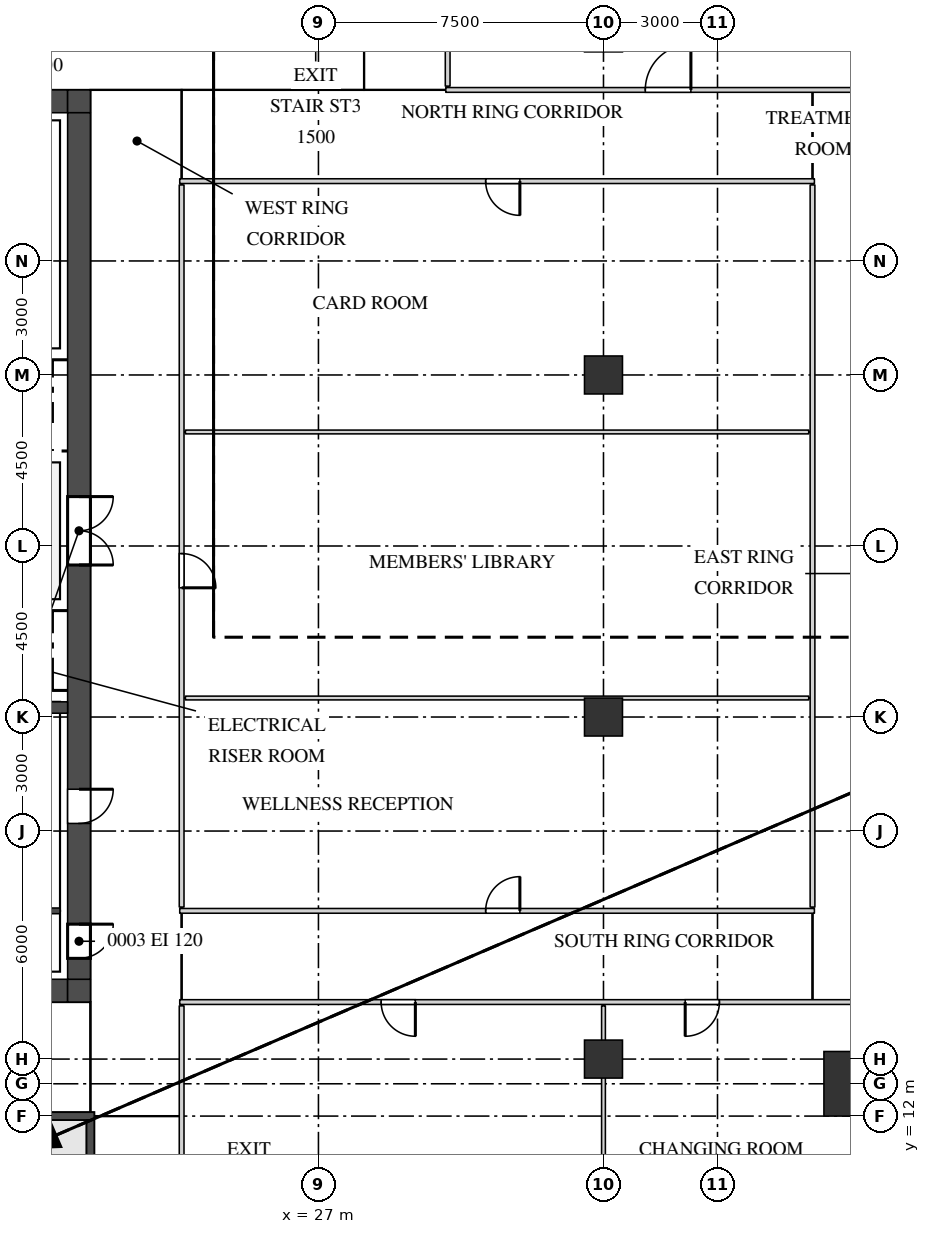
"""IFC4 building model, lengths in metres.
Left out: names, types, materials, properties, quantities, classifications, styles, units other than length and angle.
Written with IfcOpenShell. Run it as: python <this file> out.ifc"""

import sys

from ifc_helpers import new_model, si_unit, direction, frame, frame_2d, origin, origin_2d, place, context, subcontext, project, spatial, rectangle, extrude, source, transform, mapped, element, fill, save


model = new_model("IFC4")
c1 = context("Model", 3, precision=1e-05, world=origin(), true_north=direction((0.0, 1.0)))
c2 = subcontext(c1, "Body", "Model", "MODEL_VIEW")
j1 = project(units=[si_unit("LENGTHUNIT", "METRE"), si_unit("PLANEANGLEUNIT", "RADIAN")], contexts=[c1])
p1 = place(None, origin())
s1 = spatial("IfcSite", under=j1, at=p1, CompositionType="ELEMENT")
p2 = place(p1, origin())
s2 = spatial("IfcBuilding", under=s1, at=p2, CompositionType="ELEMENT")
p3 = place(p2, frame((0.0, 0.0, 298.2)))
s3 = spatial("IfcBuildingStorey", under=s2, at=p3, CompositionType="ELEMENT", Elevation=298.2)
m1 = source(origin(), c2, "Body", "SweptSolid", [
    extrude(rectangle(XDim=14.4, YDim=0.6, at=frame_2d((7.2, 0.0))), origin(), (0.0, 0.0, 1.0), 3.75),
])
p4 = place(p3, frame((6.0, 38.7, 0.0), z_axis=(0.0, 0.0, 1.0), x_axis=(1.0, 0.0, 0.0)))
e1 = element("IfcWall", 1, at=p4, inside=s3, PredefinedType="SHEAR", context=c2, shape_type="MappedRepresentation", body=[
    mapped(m1, transform((0.0, 0.0, 0.0))),
])
m2 = source(origin(), c2, "Body", "SweptSolid", [
    extrude(rectangle(XDim=0.9, YDim=2.1, at=frame_2d((0.45, 1.05))), frame((0.0, 0.31, 0.0), z_axis=(0.0, -1.0, 0.0), x_axis=(1.0, 0.0, 0.0)), (0.0, 0.0, 1.0), 0.62),
])
p5 = place(p4, frame((3.7, 0.0, 0.0)))
e2 = element("IfcOpeningElement", 2, at=p5, cuts=e1, PredefinedType="OPENING", context=c2, shape_type="MappedRepresentation", body=[
    mapped(m2, transform((0.0, 0.0, 0.0))),
])
p6 = place(p4, frame((8.7, 0.0, 0.0)))
e3 = element("IfcOpeningElement", 3, at=p6, cuts=e1, PredefinedType="OPENING", context=c2, shape_type="MappedRepresentation", body=[
    mapped(m2, transform((0.0, 0.0, 0.0))),
])
p7 = place(p4, frame((12.05, 0.0, 0.0)))
e4 = element("IfcOpeningElement", 4, at=p7, cuts=e1, PredefinedType="OPENING", context=c2, shape_type="MappedRepresentation", body=[
    mapped(m2, transform((0.0, 0.0, 0.0))),
])
m3 = source(origin(), c2, "Body", "SweptSolid", [
    extrude(rectangle(XDim=0.6, YDim=0.6, at=frame_2d((0.3, 0.0))), origin(), (0.0, 0.0, 1.0), 3.75),
])
p8 = place(p3, frame((20.4, 38.7, 0.0), z_axis=(0.0, 0.0, 1.0), x_axis=(1.0, 0.0, 0.0)))
e5 = element("IfcWall", 5, at=p8, inside=s3, PredefinedType="SHEAR", context=c2, shape_type="MappedRepresentation", body=[
    mapped(m3, transform((0.0, 0.0, 0.0))),
])
p9 = place(p3, frame((6.0, 15.3, 0.0), z_axis=(0.0, 0.0, 1.0), x_axis=(1.0, 0.0, 0.0)))
e6 = element("IfcWall", 6, at=p9, inside=s3, PredefinedType="SHEAR", context=c2, shape_type="MappedRepresentation", body=[
    mapped(m1, transform((0.0, 0.0, 0.0))),
])
m4 = source(origin(), c2, "Body", "SweptSolid", [
    extrude(rectangle(XDim=1.2, YDim=2.1, at=frame_2d((0.6, 1.05))), frame((0.0, 0.31, 0.0), z_axis=(0.0, -1.0, 0.0), x_axis=(1.0, 0.0, 0.0)), (0.0, 0.0, 1.0), 0.62),
])
p10 = place(p9, frame((6.2, 0.0, 0.0)))
e7 = element("IfcOpeningElement", 7, at=p10, cuts=e6, PredefinedType="OPENING", context=c2, shape_type="MappedRepresentation", body=[
    mapped(m4, transform((0.0, 0.0, 0.0))),
])
p11 = place(p9, frame((2.85, 0.0, 0.0)))
e8 = element("IfcOpeningElement", 8, at=p11, cuts=e6, PredefinedType="OPENING", context=c2, shape_type="MappedRepresentation", body=[
    mapped(m4, transform((0.0, 0.0, 0.0))),
])
m5 = source(origin(), c2, "Body", "SweptSolid", [
    extrude(rectangle(XDim=1.0, YDim=2.1, at=frame_2d((0.5, 1.05))), frame((0.0, 0.31, 0.0), z_axis=(0.0, -1.0, 0.0), x_axis=(1.0, 0.0, 0.0)), (0.0, 0.0, 1.0), 0.62),
])
p12 = place(p9, frame((8.7, 0.0, 0.0)))
e9 = element("IfcOpeningElement", 9, at=p12, cuts=e6, PredefinedType="OPENING", context=c2, shape_type="MappedRepresentation", body=[
    mapped(m5, transform((0.0, 0.0, 0.0))),
])
p13 = place(p3, frame((20.4, 15.3, 0.0), z_axis=(0.0, 0.0, 1.0), x_axis=(1.0, 0.0, 0.0)))
e10 = element("IfcWall", 10, at=p13, inside=s3, PredefinedType="SHEAR", context=c2, shape_type="MappedRepresentation", body=[
    mapped(m3, transform((0.0, 0.0, 0.0))),
])
m6 = source(origin(), c2, "Body", "SweptSolid", [
    extrude(rectangle(XDim=22.8, YDim=0.6, at=frame_2d((11.4, 0.0))), origin(), (0.0, 0.0, 1.0), 3.75),
])
p14 = place(p3, frame((20.7, 15.6, 0.0), z_axis=(0.0, 0.0, 1.0), x_axis=(0.0, 1.0, 0.0)))
e11 = element("IfcWall", 11, at=p14, inside=s3, PredefinedType="SHEAR", context=c2, shape_type="MappedRepresentation", body=[
    mapped(m6, transform((0.0, 0.0, 0.0))),
])
m7 = source(origin(), c2, "Body", "SweptSolid", [
    extrude(rectangle(XDim=1.8, YDim=2.1, at=frame_2d((0.9, 1.05))), frame((0.0, 0.31, 0.0), z_axis=(0.0, -1.0, 0.0), x_axis=(1.0, 0.0, 0.0)), (0.0, 0.0, 1.0), 0.62),
])
p15 = place(p14, frame((10.9, 0.0, 0.0)))
e12 = element("IfcOpeningElement", 12, at=p15, cuts=e11, PredefinedType="OPENING", context=c2, shape_type="MappedRepresentation", body=[
    mapped(m7, transform((0.0, 0.0, 0.0))),
])
p16 = place(p14, frame((0.55, 0.0, 0.0)))
e13 = element("IfcOpeningElement", 13, at=p16, cuts=e11, PredefinedType="OPENING", context=c2, shape_type="MappedRepresentation", body=[
    mapped(m2, transform((0.0, 0.0, 0.0))),
])
p17 = place(p14, frame((4.1, 0.0, 0.0)))
e14 = element("IfcOpeningElement", 14, at=p17, cuts=e11, PredefinedType="OPENING", context=c2, shape_type="MappedRepresentation", body=[
    mapped(m2, transform((0.0, 0.0, 0.0))),
])
m8 = source(origin(), c2, "Body", "SweptSolid", [
    extrude(rectangle(XDim=7.2, YDim=0.2, at=frame_2d((3.6, 0.0))), origin(), (0.0, 0.0, 1.0), 3.75),
])
p18 = place(p3, frame((13.9, 12.0, 0.0), z_axis=(0.0, 0.0, 1.0), x_axis=(1.0, 0.0, 0.0)))
e15 = element("IfcWall", 15, at=p18, inside=s3, PredefinedType="SHEAR", context=c2, shape_type="MappedRepresentation", body=[
    mapped(m8, transform((0.0, 0.0, 0.0))),
])
m9 = source(origin(), c2, "Body", "SweptSolid", [
    extrude(rectangle(XDim=3.35, YDim=0.2, at=frame_2d((1.675, 0.0))), origin(), (0.0, 0.0, 1.0), 3.75),
])
p19 = place(p3, frame((21.0, 8.55, 0.0), z_axis=(0.0, 0.0, 1.0), x_axis=(0.0, 1.0, 0.0)))
e16 = element("IfcWall", 16, at=p19, inside=s3, PredefinedType="SHEAR", context=c2, shape_type="MappedRepresentation", body=[
    mapped(m9, transform((0.0, 0.0, 0.0))),
])
m10 = source(origin(), c2, "Body", "SweptSolid", [
    extrude(rectangle(XDim=13.2, YDim=0.3, at=frame_2d((6.6, 0.0))), origin(), (0.0, 0.0, 1.0), 3.75),
])
p20 = place(p3, frame((7.2, 22.75, 0.0), z_axis=(0.0, 0.0, 1.0), x_axis=(1.0, 0.0, 0.0)))
e17 = element("IfcWall", 17, at=p20, inside=s3, PredefinedType="STANDARD", context=c2, shape_type="MappedRepresentation", body=[
    mapped(m10, transform((0.0, 0.0, 0.0))),
])
m11 = source(origin(), c2, "Body", "SweptSolid", [
    extrude(rectangle(XDim=1.7, YDim=1.7, at=origin_2d()), origin(), (0.0, 0.0, 1.0), 3.75),
])
p21 = place(p3, frame((41.15, 12.85, 0.0), z_axis=(0.0, 0.0, 1.0), x_axis=(1.0, 0.0, 0.0)))
e18 = element("IfcColumn", 18, at=p21, inside=s3, PredefinedType="COLUMN", context=c2, shape_type="MappedRepresentation", body=[
    mapped(m11, transform((0.0, 0.0, 0.0))),
])
m12 = source(origin(), c2, "Body", "SweptSolid", [
    extrude(rectangle(XDim=1.0, YDim=1.0, at=origin_2d()), origin(), (0.0, 0.0, 1.0), 3.75),
])
for number, where, z_axis, x_axis in (
    (19, (34.5, 13.5, 0.0), (0.0, 0.0, 1.0), (1.0, 0.0, 0.0)),
    (20, (34.5, 22.5, 0.0), (0.0, 0.0, 1.0), (1.0, 0.0, 0.0)),
    (21, (34.5, 31.5, 0.0), (0.0, 0.0, 1.0), (1.0, 0.0, 0.0)),
):
    element("IfcColumn", number, at=place(p3, frame(where, z_axis=z_axis, x_axis=x_axis)), inside=s3, PredefinedType="COLUMN", context=c2, shape_type="MappedRepresentation", body=[
        mapped(m12, transform((0.0, 0.0, 0.0))),
    ])
m13 = source(origin(), c2, "Body", "SweptSolid", [
    extrude(rectangle(XDim=8.75, YDim=0.125, at=frame_2d((4.375, 0.0))), origin(), (0.0, 0.0, 1.0), 3.8),
])
p22 = place(p3, frame((23.4, 6.15, 0.0), z_axis=(0.0, 0.0, 1.0), x_axis=(0.0, 1.0, 0.0)))
e22 = element("IfcWall", 22, at=p22, inside=s3, PredefinedType="PARTITIONING", context=c2, shape_type="MappedRepresentation", body=[
    mapped(m13, transform((0.0, 0.0, 0.0))),
])
m14 = source(origin(), c2, "Body", "SweptSolid", [
    extrude(rectangle(XDim=8.75, YDim=0.1, at=frame_2d((4.375, 0.0))), origin(), (0.0, 0.0, 1.0), 3.35),
])
p23 = place(p3, frame((34.5, 6.15, 0.0), z_axis=(0.0, 0.0, 1.0), x_axis=(0.0, 1.0, 0.0)))
e23 = element("IfcWall", 23, at=p23, inside=s3, PredefinedType="PARTITIONING", context=c2, shape_type="MappedRepresentation", body=[
    mapped(m14, transform((0.0, 0.0, 0.0))),
])
m15 = source(origin(), c2, "Body", "SweptSolid", [
    extrude(rectangle(XDim=19.1, YDim=0.125, at=frame_2d((9.55, 0.0))), origin(), (0.0, 0.0, 1.0), 3.8),
])
p24 = place(p3, frame((23.35, 15.0, 0.0), z_axis=(0.0, 0.0, 1.0), x_axis=(1.0, 0.0, 0.0)))
e24 = element("IfcWall", 24, at=p24, inside=s3, PredefinedType="PARTITIONING", context=c2, shape_type="MappedRepresentation", body=[
    mapped(m15, transform((0.0, 0.0, 0.0))),
])
m16 = source(origin(), c2, "Body", "SweptSolid", [
    extrude(rectangle(XDim=0.9, YDim=2.1, at=frame_2d((0.45, 1.05))), frame((0.0, 0.073, 0.0), z_axis=(0.0, -1.0, 0.0), x_axis=(1.0, 0.0, 0.0)), (0.0, 0.0, 1.0), 0.145),
])
p25 = place(p24, frame((5.3, 0.0, 0.0)))
e25 = element("IfcOpeningElement", 25, at=p25, cuts=e24, PredefinedType="OPENING", context=c2, shape_type="MappedRepresentation", body=[
    mapped(m16, transform((0.0, 0.0, 0.0))),
])
p26 = place(p24, frame((13.3, 0.0, 0.0)))
e26 = element("IfcOpeningElement", 26, at=p26, cuts=e24, PredefinedType="OPENING", context=c2, shape_type="MappedRepresentation", body=[
    mapped(m16, transform((0.0, 0.0, 0.0))),
])
p27 = place(p24, frame((17.95, 0.0, 0.0)))
e27 = element("IfcOpeningElement", 27, at=p27, cuts=e24, PredefinedType="OPENING", context=c2, shape_type="MappedRepresentation", body=[
    mapped(m16, transform((0.0, 0.0, 0.0))),
])
m17 = source(origin(), c2, "Body", "SweptSolid", [
    extrude(rectangle(XDim=4.0, YDim=0.15, at=frame_2d((2.0, 0.0))), origin(), (0.0, 0.0, 1.0), 3.8),
])
p28 = place(p3, frame((16.2, 17.4, 0.0), z_axis=(0.0, 0.0, 1.0), x_axis=(1.0, 0.0, 0.0)))
e28 = element("IfcWall", 28, at=p28, inside=s3, PredefinedType="PARTITIONING", context=c2, shape_type="MappedRepresentation", body=[
    mapped(m17, transform((0.0, 0.0, 0.0))),
])
m18 = source(origin(), c2, "Body", "SweptSolid", [
    extrude(rectangle(XDim=16.7, YDim=0.125, at=frame_2d((8.35, 0.0))), origin(), (0.0, 0.0, 1.0), 3.8),
])
p29 = place(p3, frame((23.35, 17.4, 0.0), z_axis=(0.0, 0.0, 1.0), x_axis=(1.0, 0.0, 0.0)))
e29 = element("IfcWall", 29, at=p29, inside=s3, PredefinedType="PARTITIONING", context=c2, shape_type="MappedRepresentation", body=[
    mapped(m18, transform((0.0, 0.0, 0.0))),
])
p30 = place(p29, frame((8.05, 0.0, 0.0)))
e30 = element("IfcOpeningElement", 30, at=p30, cuts=e29, PredefinedType="OPENING", context=c2, shape_type="MappedRepresentation", body=[
    mapped(m16, transform((0.0, 0.0, 0.0))),
])
m19 = source(origin(), c2, "Body", "SweptSolid", [
    extrude(rectangle(XDim=19.0, YDim=0.125, at=frame_2d((9.5, 0.0))), origin(), (0.0, 0.0, 1.0), 3.8),
])
p31 = place(p3, frame((23.4, 17.5, 0.0), z_axis=(0.0, 0.0, 1.0), x_axis=(0.0, 1.0, 0.0)))
e31 = element("IfcWall", 31, at=p31, inside=s3, PredefinedType="PARTITIONING", context=c2, shape_type="MappedRepresentation", body=[
    mapped(m19, transform((0.0, 0.0, 0.0))),
])
p32 = place(p31, frame((8.4, 0.0, 0.0)))
e32 = element("IfcOpeningElement", 32, at=p32, cuts=e31, PredefinedType="OPENING", context=c2, shape_type="MappedRepresentation", body=[
    mapped(m16, transform((0.0, 0.0, 0.0))),
])
p33 = place(p3, frame((40.0, 17.5, 0.0), z_axis=(0.0, 0.0, 1.0), x_axis=(0.0, 1.0, 0.0)))
e33 = element("IfcWall", 33, at=p33, inside=s3, PredefinedType="PARTITIONING", context=c2, shape_type="MappedRepresentation", body=[
    mapped(m19, transform((0.0, 0.0, 0.0))),
])
m20 = source(origin(), c2, "Body", "SweptSolid", [
    extrude(rectangle(XDim=16.4, YDim=0.1, at=frame_2d((8.2, 0.0))), origin(), (0.0, 0.0, 1.0), 3.8),
])
for number, where, z_axis, x_axis in (
    (34, (23.5, 23.0, 0.0), (0.0, 0.0, 1.0), (1.0, 0.0, 0.0)),
    (35, (23.5, 30.0, 0.0), (0.0, 0.0, 1.0), (1.0, 0.0, 0.0)),
):
    element("IfcWall", number, at=place(p3, frame(where, z_axis=z_axis, x_axis=x_axis)), inside=s3, PredefinedType="PARTITIONING", context=c2, shape_type="MappedRepresentation", body=[
        mapped(m20, transform((0.0, 0.0, 0.0))),
    ])
p34 = place(p3, frame((23.35, 36.6, 0.0), z_axis=(0.0, 0.0, 1.0), x_axis=(1.0, 0.0, 0.0)))
e36 = element("IfcWall", 36, at=p34, inside=s3, PredefinedType="PARTITIONING", context=c2, shape_type="MappedRepresentation", body=[
    mapped(m18, transform((0.0, 0.0, 0.0))),
])
p35 = place(p34, frame((8.05, 0.0, 0.0)))
e37 = element("IfcOpeningElement", 37, at=p35, cuts=e36, PredefinedType="OPENING", context=c2, shape_type="MappedRepresentation", body=[
    mapped(m16, transform((0.0, 0.0, 0.0))),
])
m21 = source(origin(), c2, "Body", "SweptSolid", [
    extrude(rectangle(XDim=12.1, YDim=0.125, at=frame_2d((6.05, 0.0))), origin(), (0.0, 0.0, 1.0), 3.8),
])
p36 = place(p3, frame((30.35, 39.0, 0.0), z_axis=(0.0, 0.0, 1.0), x_axis=(1.0, 0.0, 0.0)))
e38 = element("IfcWall", 38, at=p36, inside=s3, PredefinedType="PARTITIONING", context=c2, shape_type="MappedRepresentation", body=[
    mapped(m21, transform((0.0, 0.0, 0.0))),
])
m22 = source(origin(), c2, "Body", "SweptSolid", [
    extrude(rectangle(XDim=1.2, YDim=2.1, at=frame_2d((0.6, 1.05))), frame((0.0, 0.073, 0.0), z_axis=(0.0, -1.0, 0.0), x_axis=(1.0, 0.0, 0.0)), (0.0, 0.0, 1.0), 0.145),
])
p37 = place(p36, frame((5.25, 0.0, 0.0)))
e39 = element("IfcOpeningElement", 39, at=p37, cuts=e38, PredefinedType="OPENING", context=c2, shape_type="MappedRepresentation", body=[
    mapped(m22, transform((0.0, 0.0, 0.0))),
])
p38 = place(p3, frame((30.4, 39.1, 0.0), z_axis=(0.0, 0.0, 1.0), x_axis=(0.0, 1.0, 0.0)))
e40 = element("IfcWall", 40, at=p38, inside=s3, PredefinedType="PARTITIONING", context=c2, shape_type="MappedRepresentation", body=[
    mapped(m13, transform((0.0, 0.0, 0.0))),
])
m23 = source(origin(), c2, "Body", "SweptSolid", [
    extrude(rectangle(XDim=1.8, YDim=2.1, at=frame_2d((0.9, 1.05))), frame((0.0, 0.25, 0.0), z_axis=(0.0, -1.0, 0.0), x_axis=(1.0, 0.0, 0.0)), (0.0, 0.0, 1.0), 0.5),
])
p39 = place(p15, origin())
e41 = element("IfcDoor", 41, at=p39, inside=s3, OperationType="DOUBLE_DOOR_SINGLE_SWING", PredefinedType="DOOR", context=c2, shape_type="MappedRepresentation", body=[
    mapped(m23, transform((0.0, 0.0, 0.0))),
])
fill(e12, e41)
m24 = source(origin(), c2, "Body", "SweptSolid", [
    extrude(rectangle(XDim=0.9, YDim=2.1, at=frame_2d((0.45, 1.05))), frame((0.0, 0.25, 0.0), z_axis=(0.0, -1.0, 0.0), x_axis=(1.0, 0.0, 0.0)), (0.0, 0.0, 1.0), 0.5),
])
p40 = place(p16, origin())
e42 = element("IfcDoor", 42, at=p40, inside=s3, OperationType="SINGLE_SWING_RIGHT", PredefinedType="DOOR", context=c2, shape_type="MappedRepresentation", body=[
    mapped(m24, transform((0.0, 0.0, 0.0))),
])
fill(e13, e42)
p41 = place(p17, origin())
e43 = element("IfcDoor", 43, at=p41, inside=s3, OperationType="SINGLE_SWING_RIGHT", PredefinedType="DOOR", context=c2, shape_type="MappedRepresentation", body=[
    mapped(m24, transform((0.0, 0.0, 0.0))),
])
fill(e14, e43)
m25 = source(origin(), c2, "Body", "SweptSolid", [
    extrude(rectangle(XDim=0.9, YDim=2.1, at=frame_2d((0.45, 1.05))), frame((0.0, 0.025, 0.0), z_axis=(0.0, -1.0, 0.0), x_axis=(1.0, 0.0, 0.0)), (0.0, 0.0, 1.0), 0.05),
])
p42 = place(p25, origin())
e44 = element("IfcDoor", 44, at=p42, inside=s3, OperationType="SINGLE_SWING_RIGHT", PredefinedType="DOOR", context=c2, shape_type="MappedRepresentation", body=[
    mapped(m25, transform((0.0, 0.0, 0.0))),
])
fill(e25, e44)
p43 = place(p26, origin())
e45 = element("IfcDoor", 45, at=p43, inside=s3, OperationType="SINGLE_SWING_LEFT", PredefinedType="DOOR", context=c2, shape_type="MappedRepresentation", body=[
    mapped(m25, transform((0.0, 0.0, 0.0))),
])
fill(e26, e45)
m26 = source(origin(), c2, "Body", "SweptSolid", [
    extrude(rectangle(XDim=1.2, YDim=2.1, at=frame_2d((0.6, 1.05))), frame((0.0, 0.025, 0.0), z_axis=(0.0, -1.0, 0.0), x_axis=(1.0, 0.0, 0.0)), (0.0, 0.0, 1.0), 0.05),
])
p44 = place(p37, origin())
e46 = element("IfcDoor", 46, at=p44, inside=s3, OperationType="SINGLE_SWING_LEFT", PredefinedType="DOOR", context=c2, shape_type="MappedRepresentation", body=[
    mapped(m26, transform((0.0, 0.0, 0.0))),
])
fill(e39, e46)
p45 = place(p30, origin())
e47 = element("IfcDoor", 47, at=p45, inside=s3, OperationType="SINGLE_SWING_LEFT", PredefinedType="DOOR", context=c2, shape_type="MappedRepresentation", body=[
    mapped(m25, transform((0.0, 0.0, 0.0))),
])
fill(e30, e47)
p46 = place(p32, origin())
e48 = element("IfcDoor", 48, at=p46, inside=s3, OperationType="SINGLE_SWING_LEFT", PredefinedType="DOOR", context=c2, shape_type="MappedRepresentation", body=[
    mapped(m25, transform((0.0, 0.0, 0.0))),
])
fill(e32, e48)
p47 = place(p35, origin())
e49 = element("IfcDoor", 49, at=p47, inside=s3, OperationType="SINGLE_SWING_RIGHT", PredefinedType="DOOR", context=c2, shape_type="MappedRepresentation", body=[
    mapped(m25, transform((0.0, 0.0, 0.0))),
])
fill(e37, e49)
save(model, sys.argv[1])
